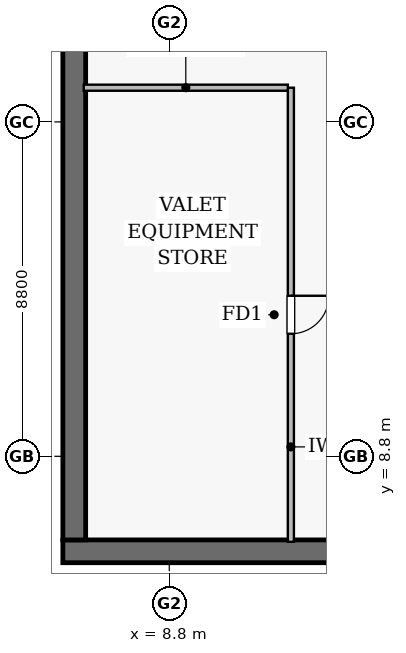
"""IFC4 building model, lengths in metres.
Left out: names, types, materials, properties, quantities, classifications, styles, units other than length and angle.
Written with IfcOpenShell. Run it as: python <this file> out.ifc"""

import sys

from ifc_helpers import new_model, si_unit, direction, frame, frame_2d, origin, place, context, subcontext, project, spatial, rectangle, extrude, element, fill, save


model = new_model("IFC4")
c1 = context("Model", 3, precision=1e-05, world=origin(), true_north=direction((0.0, 1.0)))
c2 = subcontext(c1, "Body", "Model", "MODEL_VIEW")
j1 = project(units=[si_unit("LENGTHUNIT", "METRE"), si_unit("PLANEANGLEUNIT", "RADIAN")], contexts=[c1])
p1 = place(None, origin())
s1 = spatial("IfcSite", under=j1, at=p1, CompositionType="ELEMENT")
p2 = place(p1, origin())
s2 = spatial("IfcBuilding", under=s1, at=p2, CompositionType="ELEMENT")
p3 = place(p2, frame((0.0, 0.0, -7.8)))
s3 = spatial("IfcBuildingStorey", under=s2, at=p3, CompositionType="ELEMENT", Elevation=-7.8)
p4 = place(p3, frame((6.0, 6.3, 0.0), z_axis=(0.0, 0.0, 1.0), x_axis=(1.0, 0.0, 0.0)))
e1 = element("IfcWall", 1, at=p4, inside=s3, PredefinedType="SOLIDWALL", context=c2, shape_type="SweptSolid", body=[
    extrude(rectangle(XDim=76.0, YDim=0.6, at=frame_2d((38.0, 0.0))), origin(), (0.0, 0.0, 1.0), 3.58),
])
p5 = place(p3, frame((6.3, 81.4, 0.0), z_axis=(0.0, 0.0, 1.0), x_axis=(0.0, -1.0, 0.0)))
e2 = element("IfcWall", 2, at=p5, inside=s3, PredefinedType="SOLIDWALL", context=c2, shape_type="SweptSolid", body=[
    extrude(rectangle(XDim=74.8, YDim=0.6, at=frame_2d((37.4, 0.0))), origin(), (0.0, 0.0, 1.0), 3.58),
])
p6 = place(p3, frame((12.0, 18.5, 0.0), z_axis=(0.0, 0.0, 1.0), x_axis=(0.0, -1.0, 0.0)))
e3 = element("IfcWall", 3, at=p6, inside=s3, PredefinedType="SOLIDWALL", context=c2, shape_type="SweptSolid", body=[
    extrude(rectangle(XDim=11.95, YDim=0.16, at=frame_2d((5.975, 0.0))), origin(), (0.0, 0.0, 1.0), 3.58),
])
p7 = place(p6, frame((5.475, 0.0, 0.0)))
e4 = element("IfcOpeningElement", 4, at=p7, cuts=e3, PredefinedType="OPENING", context=c2, shape_type="SweptSolid", body=[
    extrude(rectangle(XDim=1.0, YDim=2.15, at=frame_2d((0.5, 1.075))), frame((0.0, 0.09, 0.0), z_axis=(0.0, -1.0, 0.0), x_axis=(1.0, 0.0, 0.0)), (0.0, 0.0, 1.0), 0.18),
])
p8 = place(p3, frame((6.55, 18.5, 0.0), z_axis=(0.0, 0.0, 1.0), x_axis=(1.0, 0.0, 0.0)))
e5 = element("IfcWall", 5, at=p8, inside=s3, PredefinedType="SOLIDWALL", context=c2, shape_type="SweptSolid", body=[
    extrude(rectangle(XDim=5.37, YDim=0.16, at=frame_2d((2.685, 0.0))), origin(), (0.0, 0.0, 1.0), 3.58),
])
p9 = place(p7, origin())
e6 = element("IfcDoor", 6, at=p9, inside=s3, OperationType="SINGLE_SWING_LEFT", PredefinedType="DOOR", context=c2, shape_type="SweptSolid", body=[
    extrude(rectangle(XDim=1.0, YDim=2.15, at=frame_2d((0.5, 1.075))), frame((0.0, 0.025, 0.0), z_axis=(0.0, -1.0, 0.0), x_axis=(1.0, 0.0, 0.0)), (0.0, 0.0, 1.0), 0.05),
])
fill(e4, e6)
save(model, sys.argv[1])
